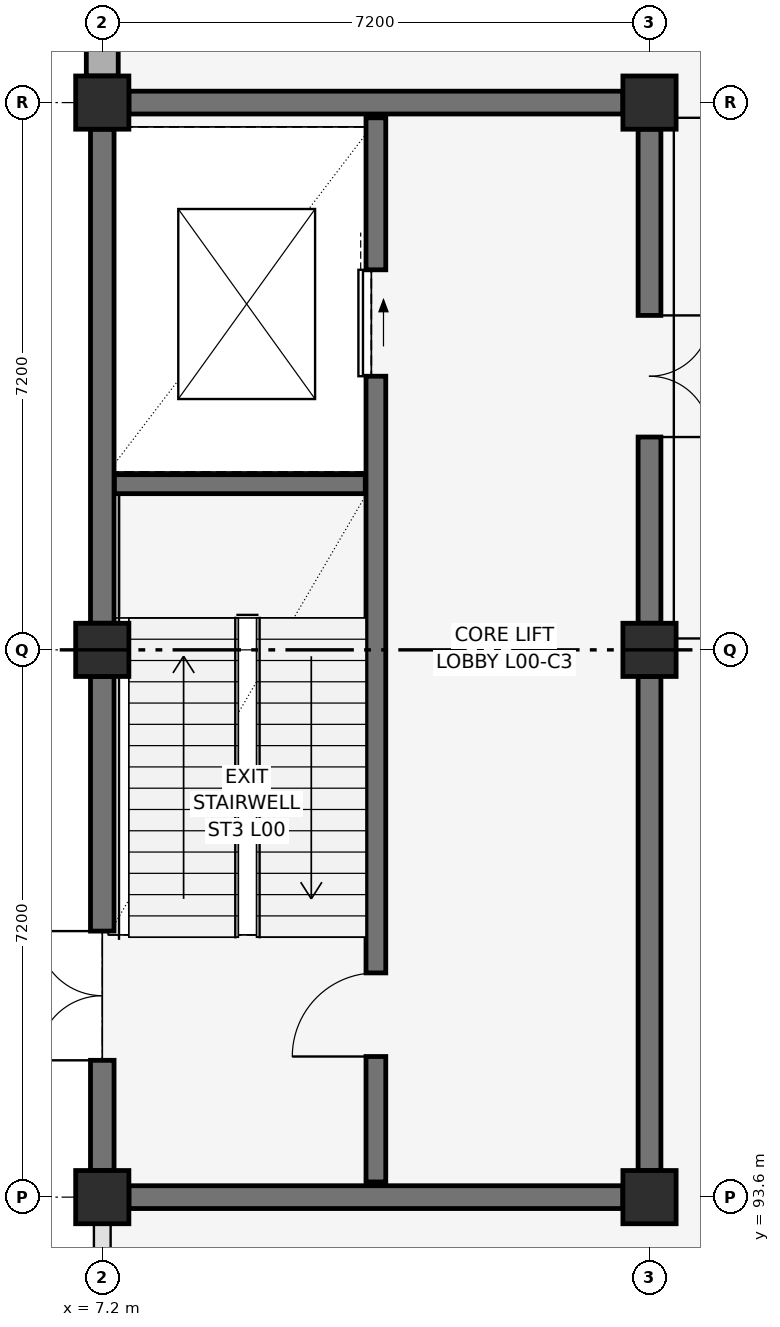
"""IFC4 building model, lengths in metres.
Left out: names, types, materials, properties, quantities, classifications, styles, units other than length and angle.
Written with IfcOpenShell. Run it as: python <this file> out.ifc"""

import sys

from ifc_helpers import new_model, si_unit, direction, frame, frame_2d, origin, origin_2d, place, context, subcontext, project, spatial, rectangle, extrude, element, fill, save


model = new_model("IFC4")
c1 = context("Model", 3, precision=1e-05, world=origin(), true_north=direction((0.0, 1.0)))
c2 = subcontext(c1, "Body", "Model", "MODEL_VIEW")
j1 = project(units=[si_unit("LENGTHUNIT", "METRE"), si_unit("PLANEANGLEUNIT", "RADIAN")], contexts=[c1])
p1 = place(None, origin())
s1 = spatial("IfcSite", under=j1, at=p1, CompositionType="ELEMENT")
p2 = place(p1, origin())
s2 = spatial("IfcBuilding", under=s1, at=p2, CompositionType="ELEMENT")
p3 = place(p2, origin())
s3 = spatial("IfcBuildingStorey", under=s2, at=p3, CompositionType="ELEMENT", Elevation=0.0)
for number, where, z_axis, x_axis in (
    (1, (7.2, 93.6, 0.0), (0.0, 0.0, 1.0), (1.0, 0.0, 0.0)),
    (2, (7.2, 100.8, 0.0), (0.0, 0.0, 1.0), (1.0, 0.0, 0.0)),
    (3, (7.2, 108.0, 0.0), (0.0, 0.0, 1.0), (1.0, 0.0, 0.0)),
    (4, (14.4, 93.6, 0.0), (0.0, 0.0, 1.0), (1.0, 0.0, 0.0)),
    (5, (14.4, 100.8, 0.0), (0.0, 0.0, 1.0), (1.0, 0.0, 0.0)),
    (6, (14.4, 108.0, 0.0), (0.0, 0.0, 1.0), (1.0, 0.0, 0.0)),
):
    element("IfcColumn", number, at=place(p3, frame(where, z_axis=z_axis, x_axis=x_axis)), inside=s3, PredefinedType="COLUMN", context=c2, shape_type="SweptSolid", body=[
        extrude(rectangle(XDim=0.7, YDim=0.7, at=origin_2d()), origin(), (0.0, 0.0, 1.0), 5.4),
    ])
p4 = place(p3, frame((7.2, 108.35, 0.0), z_axis=(0.0, 0.0, 1.0), x_axis=(0.0, 1.0, 0.0)))
e7 = element("IfcWall", 7, at=p4, inside=s3, PredefinedType="SOLIDWALL", context=c2, shape_type="SweptSolid", body=[
    extrude(rectangle(XDim=6.35, YDim=0.42, at=frame_2d((3.175, 0.0))), origin(), (0.0, 0.0, 1.0), 4.29),
])
p5 = place(p4, frame((1.775, 0.0, 0.95)))
e8 = element("IfcOpeningElement", 8, at=p5, cuts=e7, PredefinedType="OPENING", context=c2, shape_type="SweptSolid", body=[
    extrude(rectangle(XDim=2.8, YDim=1.5, at=frame_2d((1.4, 0.75))), frame((0.0, 0.225, 0.0), z_axis=(0.0, -1.0, 0.0), x_axis=(1.0, 0.0, 0.0)), (0.0, 0.0, 1.0), 0.45),
])
for number, where, z_axis, x_axis in (
    (9, (7.55, 93.6, 0.0), (0.0, 0.0, 1.0), (1.0, 0.0, 0.0)),
    (10, (7.55, 108.0, 0.0), (0.0, 0.0, 1.0), (1.0, 0.0, 0.0)),
):
    element("IfcWall", number, at=place(p3, frame(where, z_axis=z_axis, x_axis=x_axis)), inside=s3, PredefinedType="SHEAR", context=c2, shape_type="SweptSolid", body=[
        extrude(rectangle(XDim=6.5, YDim=0.3, at=frame_2d((3.25, 0.0))), origin(), (0.0, 0.0, 1.0), 5.14),
    ])
p6 = place(p3, frame((7.2, 93.95, 0.0), z_axis=(0.0, 0.0, 1.0), x_axis=(0.0, 1.0, 0.0)))
e11 = element("IfcWall", 11, at=p6, inside=s3, PredefinedType="SHEAR", context=c2, shape_type="SweptSolid", body=[
    extrude(rectangle(XDim=6.5, YDim=0.31, at=frame_2d((3.25, 0.0))), origin(), (0.0, 0.0, 1.0), 5.14),
])
p7 = place(p6, frame((1.45, 0.0, 0.0)))
e12 = element("IfcOpeningElement", 12, at=p7, cuts=e11, PredefinedType="OPENING", context=c2, shape_type="SweptSolid", body=[
    extrude(rectangle(XDim=1.7, YDim=2.3, at=frame_2d((0.85, 1.15))), frame((0.0, 0.17, 0.0), z_axis=(0.0, -1.0, 0.0), x_axis=(1.0, 0.0, 0.0)), (0.0, 0.0, 1.0), 0.34),
])
p8 = place(p3, frame((7.2, 101.15, 0.0), z_axis=(0.0, 0.0, 1.0), x_axis=(0.0, 1.0, 0.0)))
e13 = element("IfcWall", 13, at=p8, inside=s3, PredefinedType="SHEAR", context=c2, shape_type="SweptSolid", body=[
    extrude(rectangle(XDim=6.5, YDim=0.31, at=frame_2d((3.25, 0.0))), origin(), (0.0, 0.0, 1.0), 5.14),
])
p9 = place(p3, frame((14.4, 93.95, 0.0), z_axis=(0.0, 0.0, 1.0), x_axis=(0.0, 1.0, 0.0)))
e14 = element("IfcWall", 14, at=p9, inside=s3, PredefinedType="SHEAR", context=c2, shape_type="SweptSolid", body=[
    extrude(rectangle(XDim=6.5, YDim=0.3, at=frame_2d((3.25, 0.0))), origin(), (0.0, 0.0, 1.0), 5.14),
])
p10 = place(p3, frame((14.4, 101.15, 0.0), z_axis=(0.0, 0.0, 1.0), x_axis=(0.0, 1.0, 0.0)))
e15 = element("IfcWall", 15, at=p10, inside=s3, PredefinedType="SHEAR", context=c2, shape_type="SweptSolid", body=[
    extrude(rectangle(XDim=6.5, YDim=0.3, at=frame_2d((3.25, 0.0))), origin(), (0.0, 0.0, 1.0), 5.14),
])
p11 = place(p10, frame((2.45, 0.0, 0.0)))
e16 = element("IfcOpeningElement", 16, at=p11, cuts=e15, PredefinedType="OPENING", context=c2, shape_type="SweptSolid", body=[
    extrude(rectangle(XDim=1.6, YDim=2.2, at=frame_2d((0.8, 1.1))), frame((0.0, 0.165, 0.0), z_axis=(0.0, -1.0, 0.0), x_axis=(1.0, 0.0, 0.0)), (0.0, 0.0, 1.0), 0.33),
])
p12 = place(p3, frame((10.8, 93.8, 0.0), z_axis=(0.0, 0.0, 1.0), x_axis=(0.0, 1.0, 0.0)))
e17 = element("IfcWall", 17, at=p12, inside=s3, PredefinedType="SHEAR", context=c2, shape_type="SweptSolid", body=[
    extrude(rectangle(XDim=14.0, YDim=0.26, at=frame_2d((7.0, 0.0))), origin(), (0.0, 0.0, 1.0), 5.14),
])
p13 = place(p12, frame((1.65, 0.0, 0.0)))
e18 = element("IfcOpeningElement", 18, at=p13, cuts=e17, PredefinedType="OPENING", context=c2, shape_type="SweptSolid", body=[
    extrude(rectangle(XDim=1.1, YDim=2.15, at=frame_2d((0.55, 1.075))), frame((0.0, 0.145, 0.0), z_axis=(0.0, -1.0, 0.0), x_axis=(1.0, 0.0, 0.0)), (0.0, 0.0, 1.0), 0.29),
])
p14 = place(p12, frame((10.6, 0.0, 0.0)))
e19 = element("IfcOpeningElement", 19, at=p14, cuts=e17, PredefinedType="OPENING", context=c2, shape_type="SweptSolid", body=[
    extrude(rectangle(XDim=1.4, YDim=2.3, at=frame_2d((0.7, 1.15))), frame((0.0, 0.145, 0.0), z_axis=(0.0, -1.0, 0.0), x_axis=(1.0, 0.0, 0.0)), (0.0, 0.0, 1.0), 0.29),
])
p15 = place(p3, frame((7.36, 102.98, 0.0), z_axis=(0.0, 0.0, 1.0), x_axis=(1.0, 0.0, 0.0)))
e20 = element("IfcWall", 20, at=p15, inside=s3, PredefinedType="SHEAR", context=c2, shape_type="SweptSolid", body=[
    extrude(rectangle(XDim=3.3, YDim=0.25, at=frame_2d((1.65, 0.0))), origin(), (0.0, 0.0, 1.0), 5.14),
])
p16 = place(p13, origin())
e21 = element("IfcDoor", 21, at=p16, inside=s3, OperationType="SINGLE_SWING_LEFT", PredefinedType="DOOR", context=c2, shape_type="SweptSolid", body=[
    extrude(rectangle(XDim=1.1, YDim=2.15, at=frame_2d((0.55, 1.075))), frame((0.0, 0.025, 0.0), z_axis=(0.0, -1.0, 0.0), x_axis=(1.0, 0.0, 0.0)), (0.0, 0.0, 1.0), 0.05),
])
fill(e18, e21)
p17 = place(p14, frame((1.4, 0.0, 0.0), z_axis=(0.0, 0.0, 1.0), x_axis=(-1.0, 0.0, 0.0)))
e22 = element("IfcDoor", 22, at=p17, inside=s3, OperationType="SLIDING_TO_RIGHT", PredefinedType="DOOR", context=c2, shape_type="SweptSolid", body=[
    extrude(rectangle(XDim=1.4, YDim=2.3, at=frame_2d((0.7, 1.15))), frame((0.0, 0.025, 0.0), z_axis=(0.0, -1.0, 0.0), x_axis=(1.0, 0.0, 0.0)), (0.0, 0.0, 1.0), 0.05),
])
fill(e19, e22)
p18 = place(p11, frame((1.6, 0.0, 0.0), z_axis=(0.0, 0.0, 1.0), x_axis=(-1.0, 0.0, 0.0)))
e23 = element("IfcDoor", 23, at=p18, inside=s3, OperationType="DOUBLE_SWING_LEFT", PredefinedType="DOOR", context=c2, shape_type="SweptSolid", body=[
    extrude(rectangle(XDim=1.6, YDim=2.2, at=frame_2d((0.8, 1.1))), frame((0.0, 0.025, 0.0), z_axis=(0.0, -1.0, 0.0), x_axis=(1.0, 0.0, 0.0)), (0.0, 0.0, 1.0), 0.05),
])
fill(e16, e23)
p19 = place(p7, origin())
e24 = element("IfcDoor", 24, at=p19, inside=s3, OperationType="DOUBLE_SWING_LEFT", PredefinedType="DOOR", context=c2, shape_type="SweptSolid", body=[
    extrude(rectangle(XDim=1.7, YDim=2.3, at=frame_2d((0.85, 1.15))), frame((0.0, 0.025, 0.0), z_axis=(0.0, -1.0, 0.0), x_axis=(1.0, 0.0, 0.0)), (0.0, 0.0, 1.0), 0.05),
])
fill(e12, e24)
save(model, sys.argv[1])
